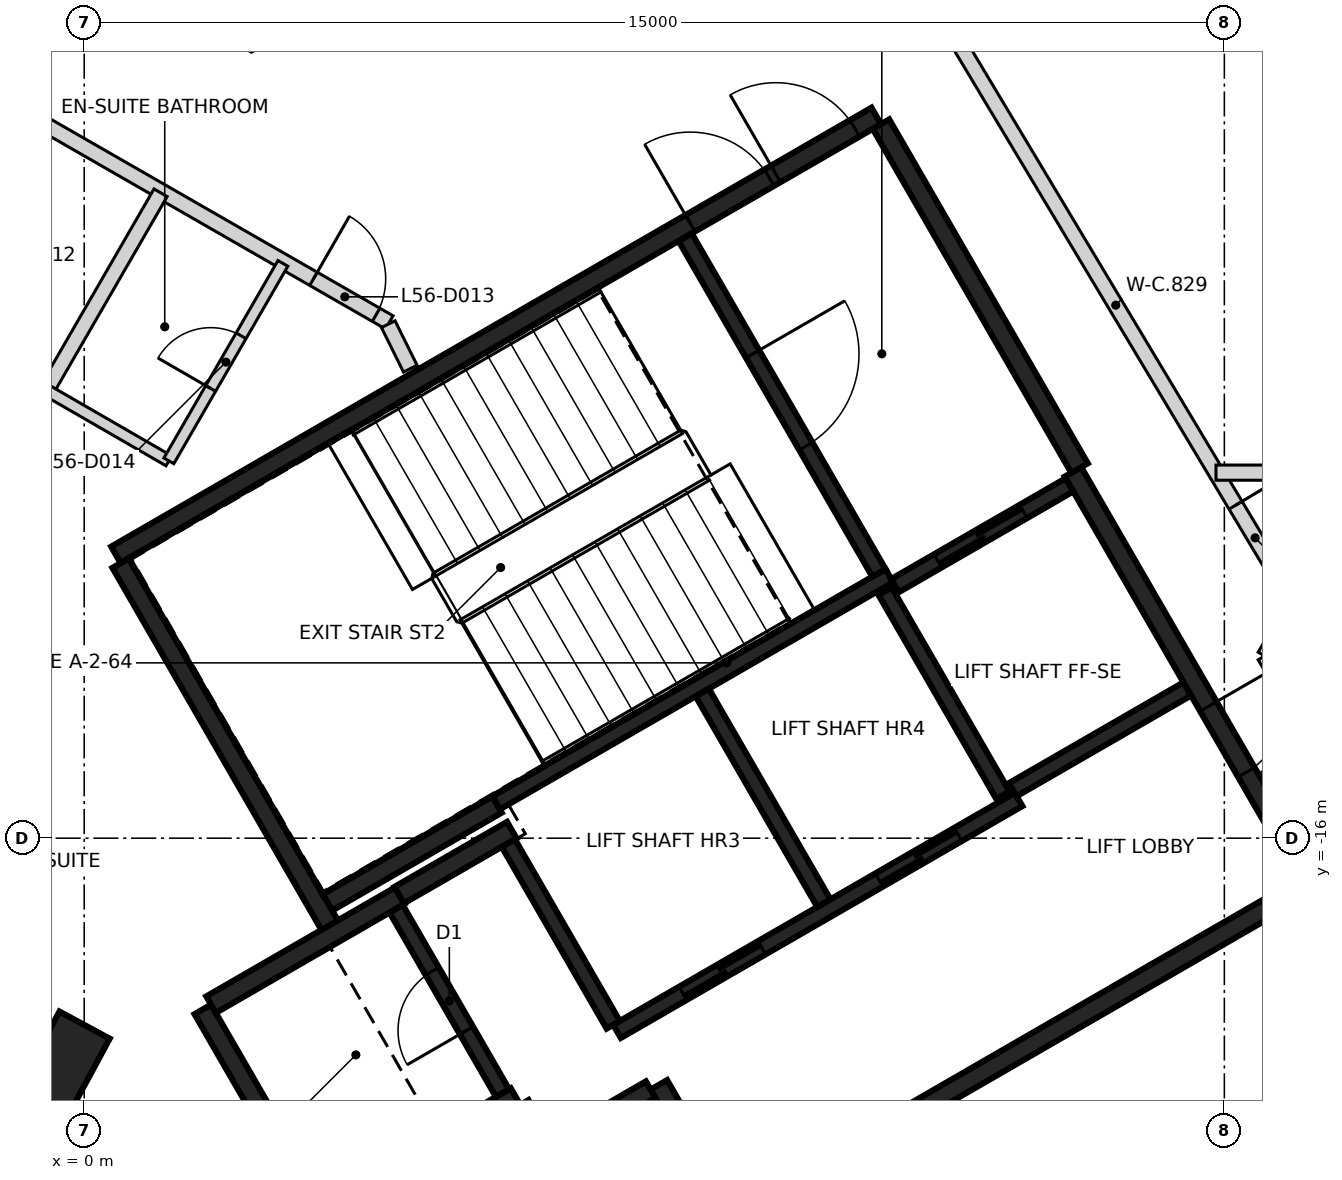
"""IFC4 building model, lengths in metres.
Left out: names, types, materials, properties, quantities, classifications, styles, units other than length and angle.
Written with IfcOpenShell. Run it as: python <this file> out.ifc"""

import sys

from ifc_helpers import new_model, si_unit, direction, frame, frame_2d, origin, origin_2d, place, context, subcontext, project, spatial, rectangle, extrude, element, fill, save


model = new_model("IFC4")
c1 = context("Model", 3, precision=1e-05, world=origin(), true_north=direction((0.0, 1.0)))
c2 = subcontext(c1, "Body", "Model", "MODEL_VIEW")
j1 = project(units=[si_unit("LENGTHUNIT", "METRE"), si_unit("PLANEANGLEUNIT", "RADIAN")], contexts=[c1])
p1 = place(None, origin())
s1 = spatial("IfcSite", under=j1, at=p1, CompositionType="ELEMENT")
p2 = place(p1, origin())
s2 = spatial("IfcBuilding", under=s1, at=p2, CompositionType="ELEMENT")
p3 = place(p2, frame((0.0, 0.0, 225.0)))
s3 = spatial("IfcBuildingStorey", under=s2, at=p3, CompositionType="ELEMENT", Elevation=225.0)
p4 = place(p3, frame((-0.256, -18.943, -0.35), z_axis=(0.0, 0.0, 1.0), x_axis=(0.474650552857, 0.880174330842, 0.0)))
e1 = element("IfcColumn", 1, at=p4, inside=s3, PredefinedType="COLUMN", context=c2, shape_type="SweptSolid", body=[
    extrude(rectangle(XDim=1.1, YDim=0.75, at=origin_2d()), origin(), (0.0, 0.0, 1.0), 3.6),
])
p5 = place(p3, frame((0.417, -12.273, 0.0), z_axis=(0.0, 0.0, 1.0), x_axis=(0.866021906294, 0.500006057782, 0.0)))
e2 = element("IfcWall", 2, at=p5, inside=s3, PredefinedType="SHEAR", context=c2, shape_type="SweptSolid", body=[
    extrude(rectangle(XDim=11.55, YDim=0.25, at=frame_2d((5.775, 0.0))), origin(), (0.0, 0.0, 1.0), 3.25),
])
p6 = place(p5, frame((10.025, 0.0, 0.0)))
e3 = element("IfcOpeningElement", 3, at=p6, cuts=e2, PredefinedType="OPENING", context=c2, shape_type="SweptSolid", body=[
    extrude(rectangle(XDim=1.2, YDim=2.1, at=frame_2d((0.6, 1.05))), frame((0.0, 0.135, 0.0), z_axis=(0.0, -1.0, 0.0), x_axis=(1.0, 0.0, 0.0)), (0.0, 0.0, 1.0), 0.27),
])
p7 = place(p5, frame((8.725, 0.0, 0.0)))
e4 = element("IfcOpeningElement", 4, at=p7, cuts=e2, PredefinedType="OPENING", context=c2, shape_type="SweptSolid", body=[
    extrude(rectangle(XDim=1.2, YDim=2.1, at=frame_2d((0.6, 1.05))), frame((0.0, 0.135, 0.0), z_axis=(0.0, -1.0, 0.0), x_axis=(1.0, 0.0, 0.0)), (0.0, 0.0, 1.0), 0.27),
])
p8 = place(p3, frame((16.133, -16.594, 0.0), z_axis=(0.0, 0.0, 1.0), x_axis=(-0.866022959057, -0.500004234368, 0.0)))
e5 = element("IfcWall", 5, at=p8, inside=s3, PredefinedType="SHEAR", context=c2, shape_type="SweptSolid", body=[
    extrude(rectangle(XDim=8.75, YDim=0.25, at=frame_2d((4.375, 0.0))), origin(), (0.0, 0.0, 1.0), 3.25),
])
p9 = place(p3, frame((13.008, -11.181, 0.0), z_axis=(0.0, 0.0, 1.0), x_axis=(0.500001955336, -0.866024274868, 0.0)))
e6 = element("IfcWall", 6, at=p9, inside=s3, PredefinedType="SHEAR", context=c2, shape_type="SweptSolid", body=[
    extrude(rectangle(XDim=6.125, YDim=0.25, at=frame_2d((3.062, 0.0))), origin(), (0.0, 0.0, 1.0), 3.25),
])
p10 = place(p9, frame((3.563, 0.0, 0.0)))
e7 = element("IfcOpeningElement", 7, at=p10, cuts=e6, PredefinedType="OPENING", context=c2, shape_type="SweptSolid", body=[
    extrude(rectangle(XDim=1.0, YDim=2.1, at=frame_2d((0.5, 1.05))), frame((0.0, 0.135, 0.0), z_axis=(0.0, -1.0, 0.0), x_axis=(1.0, 0.0, 0.0)), (0.0, 0.0, 1.0), 0.27),
])
p11 = place(p3, frame((3.235, -17.153, 0.0), z_axis=(0.0, 0.0, 1.0), x_axis=(-0.500008851346, 0.866020293397, 0.0)))
e8 = element("IfcWall", 8, at=p11, inside=s3, PredefinedType="SHEAR", context=c2, shape_type="SweptSolid", body=[
    extrude(rectangle(XDim=5.51, YDim=0.25, at=frame_2d((2.755, 0.0))), origin(), (0.0, 0.0, 1.0), 3.25),
])
p12 = place(p3, frame((10.483, -6.606, 0.0), z_axis=(0.0, 0.0, 1.0), x_axis=(0.49999885962, -0.866026062182, 0.0)))
e9 = element("IfcWall", 9, at=p12, inside=s3, PredefinedType="SHEAR", context=c2, shape_type="SweptSolid", body=[
    extrude(rectangle(XDim=5.225, YDim=0.25, at=frame_2d((2.612, 0.0))), origin(), (0.0, 0.0, 1.0), 3.25),
])
p13 = place(p3, frame((3.217, -21.122, 0.0), z_axis=(0.0, 0.0, 1.0), x_axis=(-0.499998874531, 0.866026053573, 0.0)))
e10 = element("IfcWall", 10, at=p13, inside=s3, PredefinedType="SHEAR", context=c2, shape_type="SweptSolid", body=[
    extrude(rectangle(XDim=3.313, YDim=0.25, at=frame_2d((1.656, 0.0))), origin(), (0.0, 0.0, 1.0), 3.25),
])
p14 = place(p3, frame((1.669, -18.19, 0.0), z_axis=(0.0, 0.0, 1.0), x_axis=(0.866042235819, 0.499970844928, 0.0)))
e11 = element("IfcWall", 11, at=p14, inside=s3, PredefinedType="SHEAR", context=c2, shape_type="SweptSolid", body=[
    extrude(rectangle(XDim=2.865, YDim=0.25, at=frame_2d((1.432, 0.0))), origin(), (0.0, 0.0, 1.0), 3.25),
])
p15 = place(p3, frame((5.675, -19.399, 0.0), z_axis=(0.0, 0.0, 1.0), x_axis=(-0.866026637627, -0.499997862916, 0.0)))
e12 = element("IfcWall", 12, at=p15, inside=s3, PredefinedType="SHEAR", context=c2, shape_type="SweptSolid", body=[
    extrude(rectangle(XDim=2.865, YDim=0.25, at=frame_2d((1.432, 0.0))), origin(), (0.0, 0.0, 1.0), 3.25),
])
p16 = place(p3, frame((5.431, -15.556, 0.0), z_axis=(0.0, 0.0, 1.0), x_axis=(-0.866022940537, -0.500004266446, 0.0)))
e13 = element("IfcWall", 13, at=p16, inside=s3, PredefinedType="SHEAR", context=c2, shape_type="SweptSolid", body=[
    extrude(rectangle(XDim=2.575, YDim=0.25, at=frame_2d((1.287, 0.0))), origin(), (0.0, 0.0, 1.0), 3.25),
])
p17 = place(p3, frame((8.493, -20.86, 0.0), z_axis=(0.0, 0.0, 1.0), x_axis=(-0.500039802285, 0.866002422705, 0.0)))
e14 = element("IfcWall", 14, at=p17, inside=s3, PredefinedType="SHEAR", context=c2, shape_type="SweptSolid", body=[
    extrude(rectangle(XDim=1.865, YDim=0.25, at=frame_2d((0.932, 0.0))), origin(), (0.0, 0.0, 1.0), 3.25),
])
p18 = place(p3, frame((4.145, -16.749, 0.0), z_axis=(0.0, 0.0, 1.0), x_axis=(0.866038183914, 0.499977863513, 0.0)))
e15 = element("IfcWall", 15, at=p18, inside=s3, PredefinedType="SHEAR", context=c2, shape_type="SweptSolid", body=[
    extrude(rectangle(XDim=1.71, YDim=0.25, at=frame_2d((0.855, 0.0))), origin(), (0.0, 0.0, 1.0), 3.25),
])
p19 = place(p3, frame((7.452, -19.308, 0.0), z_axis=(0.0, 0.0, 1.0), x_axis=(-0.866044474677, -0.49996696679, 0.0)))
e16 = element("IfcWall", 16, at=p19, inside=s3, PredefinedType="SHEAR", context=c2, shape_type="SweptSolid", body=[
    extrude(rectangle(XDim=1.584, YDim=0.25, at=frame_2d((0.792, 0.0))), origin(), (0.0, 0.0, 1.0), 3.25),
])
p20 = place(p3, frame((6.017, -19.992, 0.0), z_axis=(0.0, 0.0, 1.0), x_axis=(-0.500364886717, 0.865814633822, 0.0)))
e17 = element("IfcWall", 17, at=p20, inside=s3, PredefinedType="SHEAR", context=c2, shape_type="SweptSolid", body=[
    extrude(rectangle(XDim=0.559, YDim=0.25, at=frame_2d((0.28, 0.0))), origin(), (0.0, 0.0, 1.0), 3.25),
])
p21 = place(p3, frame((5.419, -15.534, 0.0), z_axis=(0.0, 0.0, 1.0), x_axis=(0.866029065029, 0.499993658486, 0.0)))
e18 = element("IfcWall", 18, at=p21, inside=s3, PredefinedType="SHEAR", context=c2, shape_type="SweptSolid", body=[
    extrude(rectangle(XDim=5.974, YDim=0.2, at=frame_2d((2.987, 0.0))), origin(), (0.0, 0.0, 1.0), 3.25),
])
p22 = place(p3, frame((7.01, -18.542, 0.0), z_axis=(0.0, 0.0, 1.0), x_axis=(0.866030299012, 0.499991521122, 0.0)))
e19 = element("IfcWall", 19, at=p22, inside=s3, PredefinedType="SHEAR", context=c2, shape_type="SweptSolid", body=[
    extrude(rectangle(XDim=6.1, YDim=0.2, at=frame_2d((3.05, 0.0))), origin(), (0.0, 0.0, 1.0), 3.25),
])
p23 = place(p22, frame((1.0, 0.0, 0.0)))
e20 = element("IfcOpeningElement", 20, at=p23, cuts=e19, PredefinedType="OPENING", context=c2, shape_type="SweptSolid", body=[
    extrude(rectangle(XDim=1.2, YDim=2.1, at=frame_2d((0.6, 1.05))), frame((0.0, 0.11, 0.0), z_axis=(0.0, -1.0, 0.0), x_axis=(1.0, 0.0, 0.0)), (0.0, 0.0, 1.0), 0.22),
])
p24 = place(p22, frame((3.982, 0.0, 0.0)))
e21 = element("IfcOpeningElement", 21, at=p24, cuts=e19, PredefinedType="OPENING", context=c2, shape_type="SweptSolid", body=[
    extrude(rectangle(XDim=1.2, YDim=2.1, at=frame_2d((0.6, 1.05))), frame((0.0, 0.11, 0.0), z_axis=(0.0, -1.0, 0.0), x_axis=(1.0, 0.0, 0.0)), (0.0, 0.0, 1.0), 0.22),
])
p25 = place(p3, frame((7.906, -8.094, 0.0), z_axis=(0.0, 0.0, 1.0), x_axis=(0.500027839223, -0.866009330205, 0.0)))
e22 = element("IfcWall", 22, at=p25, inside=s3, PredefinedType="SHEAR", context=c2, shape_type="SweptSolid", body=[
    extrude(rectangle(XDim=5.098, YDim=0.2, at=frame_2d((2.549, 0.0))), origin(), (0.0, 0.0, 1.0), 3.25),
])
p26 = place(p25, frame((1.774, 0.0, 0.0)))
e23 = element("IfcOpeningElement", 23, at=p26, cuts=e22, PredefinedType="OPENING", context=c2, shape_type="SweptSolid", body=[
    extrude(rectangle(XDim=1.4, YDim=2.1, at=frame_2d((0.7, 1.05))), frame((0.0, 0.11, 0.0), z_axis=(0.0, -1.0, 0.0), x_axis=(1.0, 0.0, 0.0)), (0.0, 0.0, 1.0), 0.22),
])
p27 = place(p3, frame((8.132, -14.084, 0.0), z_axis=(0.0, 0.0, 1.0), x_axis=(0.499997778408, -0.866026686418, 0.0)))
e24 = element("IfcWall", 24, at=p27, inside=s3, PredefinedType="SHEAR", context=c2, shape_type="SweptSolid", body=[
    extrude(rectangle(XDim=3.198, YDim=0.2, at=frame_2d((1.599, 0.0))), origin(), (0.0, 0.0, 1.0), 3.25),
])
p28 = place(p3, frame((5.503, -19.352, 0.0), z_axis=(0.0, 0.0, 1.0), x_axis=(-0.499986818241, 0.866033014143, 0.0)))
e25 = element("IfcWall", 25, at=p28, inside=s3, PredefinedType="SHEAR", context=c2, shape_type="SweptSolid", body=[
    extrude(rectangle(XDim=2.798, YDim=0.2, at=frame_2d((1.399, 0.0))), origin(), (0.0, 0.0, 1.0), 3.25),
])
p29 = place(p28, frame((0.949, 0.0, 0.0)))
e26 = element("IfcOpeningElement", 26, at=p29, cuts=e25, PredefinedType="OPENING", context=c2, shape_type="SweptSolid", body=[
    extrude(rectangle(XDim=0.9, YDim=2.1, at=frame_2d((0.45, 1.05))), frame((0.0, 0.11, 0.0), z_axis=(0.0, -1.0, 0.0), x_axis=(1.0, 0.0, 0.0)), (0.0, 0.0, 1.0), 0.22),
])
p30 = place(p3, frame((6.96, -18.455, 0.0), z_axis=(0.0, 0.0, 1.0), x_axis=(-0.499926705758, 0.866067716099, 0.0)))
e27 = element("IfcWall", 27, at=p30, inside=s3, PredefinedType="SHEAR", context=c2, shape_type="SweptSolid", body=[
    extrude(rectangle(XDim=2.759, YDim=0.2, at=frame_2d((1.38, 0.0))), origin(), (0.0, 0.0, 1.0), 3.25),
])
p31 = place(p3, frame((12.088, -15.437, 0.0), z_axis=(0.0, 0.0, 1.0), x_axis=(-0.500026960575, 0.86600983753, 0.0)))
e28 = element("IfcWall", 28, at=p31, inside=s3, PredefinedType="SHEAR", context=c2, shape_type="SweptSolid", body=[
    extrude(rectangle(XDim=3.1, YDim=0.2, at=frame_2d((1.55, 0.0))), origin(), (0.0, 0.0, 1.0), 3.25),
])
p32 = place(p3, frame((10.666, -12.678, 0.0), z_axis=(0.0, 0.0, 1.0), x_axis=(0.866018407898, 0.500012117035, 0.0)))
e29 = element("IfcWall", 29, at=p32, inside=s3, PredefinedType="SHEAR", context=c2, shape_type="SweptSolid", body=[
    extrude(rectangle(XDim=2.651, YDim=0.2, at=frame_2d((1.325, 0.0))), origin(), (0.0, 0.0, 1.0), 3.25),
])
p33 = place(p32, frame((0.652, 0.0, 0.0)))
e30 = element("IfcOpeningElement", 30, at=p33, cuts=e29, PredefinedType="OPENING", context=c2, shape_type="SweptSolid", body=[
    extrude(rectangle(XDim=1.3, YDim=2.1, at=frame_2d((0.65, 1.05))), frame((0.0, 0.11, 0.0), z_axis=(0.0, -1.0, 0.0), x_axis=(1.0, 0.0, 0.0)), (0.0, 0.0, 1.0), 0.22),
])
p34 = place(p3, frame((14.512, -14.037, 0.0), z_axis=(0.0, 0.0, 1.0), x_axis=(-0.866018407898, -0.500012117035, 0.0)))
e31 = element("IfcWall", 31, at=p34, inside=s3, PredefinedType="SHEAR", context=c2, shape_type="SweptSolid", body=[
    extrude(rectangle(XDim=2.651, YDim=0.2, at=frame_2d((1.325, 0.0))), origin(), (0.0, 0.0, 1.0), 3.25),
])
p35 = place(p3, frame((-7.089, -2.836, 0.0), z_axis=(0.0, 0.0, 1.0), x_axis=(0.867106243364, -0.498123240493, 0.0)))
e32 = element("IfcWall", 32, at=p35, inside=s3, PredefinedType="PARTITIONING", context=c2, shape_type="SweptSolid", body=[
    extrude(rectangle(XDim=12.804, YDim=0.2, at=frame_2d((6.402, 0.0))), origin(), (0.0, 0.0, 1.0), 3.25),
])
p36 = place(p35, frame((1.909, 0.0, 0.0)))
e33 = element("IfcOpeningElement", 33, at=p36, cuts=e32, PredefinedType="OPENING", context=c2, shape_type="SweptSolid", body=[
    extrude(rectangle(XDim=1.0, YDim=2.1, at=frame_2d((0.5, 1.05))), frame((0.0, 0.11, 0.0), z_axis=(0.0, -1.0, 0.0), x_axis=(1.0, 0.0, 0.0)), (0.0, 0.0, 1.0), 0.22),
])
p37 = place(p35, frame((4.91, 0.0, 0.0)))
e34 = element("IfcOpeningElement", 34, at=p37, cuts=e32, PredefinedType="OPENING", context=c2, shape_type="SweptSolid", body=[
    extrude(rectangle(XDim=0.95, YDim=2.1, at=frame_2d((0.475, 1.05))), frame((0.0, 0.11, 0.0), z_axis=(0.0, -1.0, 0.0), x_axis=(1.0, 0.0, 0.0)), (0.0, 0.0, 1.0), 0.22),
])
p38 = place(p35, frame((11.654, 0.0, 0.0)))
e35 = element("IfcOpeningElement", 35, at=p38, cuts=e32, PredefinedType="OPENING", context=c2, shape_type="SweptSolid", body=[
    extrude(rectangle(XDim=0.95, YDim=2.1, at=frame_2d((0.475, 1.05))), frame((0.0, 0.11, 0.0), z_axis=(0.0, -1.0, 0.0), x_axis=(1.0, 0.0, 0.0)), (0.0, 0.0, 1.0), 0.22),
])
p39 = place(p3, frame((4.0, -9.238, 0.0), z_axis=(0.0, 0.0, 1.0), x_axis=(0.444370954227, -0.89584287408, 0.0)))
e36 = element("IfcWall", 36, at=p39, inside=s3, PredefinedType="PARTITIONING", context=c2, shape_type="SweptSolid", body=[
    extrude(rectangle(XDim=0.653, YDim=0.2, at=frame_2d((0.327, 0.0))), origin(), (0.0, 0.0, 1.0), 3.25),
])
p40 = place(p3, frame((11.217, -5.058, 0.0), z_axis=(0.0, 0.0, 1.0), x_axis=(0.513856906336, -0.857875911662, 0.0)))
e37 = element("IfcWall", 37, at=p40, inside=s3, PredefinedType="PARTITIONING", context=c2, shape_type="SweptSolid", body=[
    extrude(rectangle(XDim=9.163, YDim=0.2, at=frame_2d((4.581, 0.0))), origin(), (0.0, 0.0, 1.0), 3.25),
])
p41 = place(p40, frame((7.65, 0.0, 0.0)))
e38 = element("IfcOpeningElement", 38, at=p41, cuts=e37, PredefinedType="OPENING", context=c2, shape_type="SweptSolid", body=[
    extrude(rectangle(XDim=1.0, YDim=2.1, at=frame_2d((0.5, 1.05))), frame((0.0, 0.11, 0.0), z_axis=(0.0, -1.0, 0.0), x_axis=(1.0, 0.0, 0.0)), (0.0, 0.0, 1.0), 0.22),
])
p42 = place(p3, frame((15.55, -15.213, 0.0), z_axis=(0.0, 0.0, 1.0), x_axis=(0.865989998118, 0.500061319399, 0.0)))
e39 = element("IfcWall", 39, at=p42, inside=s3, PredefinedType="PARTITIONING", context=c2, shape_type="SweptSolid", body=[
    extrude(rectangle(XDim=0.79, YDim=0.2, at=frame_2d((0.395, 0.0))), origin(), (0.0, 0.0, 1.0), 2.35),
])
p43 = place(p3, frame((15.532, -13.603, 0.0), z_axis=(0.0, 0.0, 1.0), x_axis=(0.498203662485, 0.867060038686, 0.0)))
e40 = element("IfcWall", 40, at=p43, inside=s3, PredefinedType="PARTITIONING", context=c2, shape_type="SweptSolid", body=[
    extrude(rectangle(XDim=0.789, YDim=0.2, at=frame_2d((0.395, 0.0))), origin(), (0.0, 0.0, 1.0), 3.25),
])
p44 = place(p3, frame((15.532, -13.603, 0.0), z_axis=(0.0, 0.0, 1.0), x_axis=(0.500199332748, -0.865910288378, 0.0)))
e41 = element("IfcWall", 41, at=p44, inside=s3, PredefinedType="PARTITIONING", context=c2, shape_type="SweptSolid", body=[
    extrude(rectangle(XDim=1.403, YDim=0.2, at=frame_2d((0.702, 0.0))), origin(), (0.0, 0.0, 1.0), 2.35),
])
p45 = place(p3, frame((-5.097, -18.078, 0.0), z_axis=(0.0, 0.0, 1.0), x_axis=(0.499960272111, 0.866048339477, 0.0)))
e42 = element("IfcWall", 42, at=p45, inside=s3, PredefinedType="PARTITIONING", context=c2, shape_type="SweptSolid", body=[
    extrude(rectangle(XDim=12.204, YDim=0.2, at=frame_2d((6.102, 0.0))), origin(), (0.0, 0.0, 1.0), 3.25),
])
p46 = place(p3, frame((14.89, -11.191, 0.0), z_axis=(0.0, 0.0, 1.0), x_axis=(1.0, 0.0, 0.0)))
e43 = element("IfcWall", 43, at=p46, inside=s3, PredefinedType="PARTITIONING", context=c2, shape_type="SweptSolid", body=[
    extrude(rectangle(XDim=3.142, YDim=0.2, at=frame_2d((1.571, 0.0))), origin(), (0.0, 0.0, 1.0), 2.35),
])
p47 = place(p3, frame((-2.833, -8.757, 0.0), z_axis=(0.0, 0.0, 1.0), x_axis=(0.866002713795, -0.500039298155, 0.0)))
e44 = element("IfcWall", 44, at=p47, inside=s3, PredefinedType="PARTITIONING", context=c2, shape_type="SweptSolid", body=[
    extrude(rectangle(XDim=4.558, YDim=0.15, at=frame_2d((2.279, 0.0))), origin(), (0.0, 0.0, 1.0), 3.25),
])
p48 = place(p3, frame((1.114, -11.036, 0.0), z_axis=(0.0, 0.0, 1.0), x_axis=(0.50002537861, 0.866010750942, 0.0)))
e45 = element("IfcWall", 45, at=p48, inside=s3, PredefinedType="PARTITIONING", context=c2, shape_type="SweptSolid", body=[
    extrude(rectangle(XDim=3.0, YDim=0.15, at=frame_2d((1.5, 0.0))), origin(), (0.0, 0.0, 1.0), 3.25),
])
p49 = place(p48, frame((1.1, 0.0, 0.0)))
e46 = element("IfcOpeningElement", 46, at=p49, cuts=e45, PredefinedType="OPENING", context=c2, shape_type="SweptSolid", body=[
    extrude(rectangle(XDim=0.8, YDim=2.1, at=frame_2d((0.4, 1.05))), frame((0.0, 0.085, 0.0), z_axis=(0.0, -1.0, 0.0), x_axis=(1.0, 0.0, 0.0)), (0.0, 0.0, 1.0), 0.17),
])
p50 = place(p33, origin())
e47 = element("IfcDoor", 47, at=p50, inside=s3, OperationType="SLIDING_TO_LEFT", PredefinedType="DOOR", context=c2, shape_type="SweptSolid", body=[
    extrude(rectangle(XDim=1.3, YDim=2.1, at=frame_2d((0.65, 1.05))), frame((0.0, 0.025, 0.0), z_axis=(0.0, -1.0, 0.0), x_axis=(1.0, 0.0, 0.0)), (0.0, 0.0, 1.0), 0.05),
])
fill(e30, e47)
p51 = place(p23, origin())
e48 = element("IfcDoor", 48, at=p51, inside=s3, OperationType="DOUBLE_DOOR_SLIDING", PredefinedType="DOOR", context=c2, shape_type="SweptSolid", body=[
    extrude(rectangle(XDim=1.2, YDim=2.1, at=frame_2d((0.6, 1.05))), frame((0.0, 0.025, 0.0), z_axis=(0.0, -1.0, 0.0), x_axis=(1.0, 0.0, 0.0)), (0.0, 0.0, 1.0), 0.05),
])
fill(e20, e48)
p52 = place(p24, origin())
e49 = element("IfcDoor", 49, at=p52, inside=s3, OperationType="DOUBLE_DOOR_SLIDING", PredefinedType="DOOR", context=c2, shape_type="SweptSolid", body=[
    extrude(rectangle(XDim=1.2, YDim=2.1, at=frame_2d((0.6, 1.05))), frame((0.0, 0.025, 0.0), z_axis=(0.0, -1.0, 0.0), x_axis=(1.0, 0.0, 0.0)), (0.0, 0.0, 1.0), 0.05),
])
fill(e21, e49)
p53 = place(p10, origin())
e50 = element("IfcDoor", 50, at=p53, inside=s3, OperationType="SINGLE_SWING_LEFT", PredefinedType="DOOR", context=c2, shape_type="SweptSolid", body=[
    extrude(rectangle(XDim=1.0, YDim=2.1, at=frame_2d((0.5, 1.05))), frame((0.0, 0.025, 0.0), z_axis=(0.0, -1.0, 0.0), x_axis=(1.0, 0.0, 0.0)), (0.0, 0.0, 1.0), 0.05),
])
fill(e7, e50)
p54 = place(p6, origin())
e51 = element("IfcDoor", 51, at=p54, inside=s3, OperationType="SINGLE_SWING_LEFT", PredefinedType="DOOR", context=c2, shape_type="SweptSolid", body=[
    extrude(rectangle(XDim=1.2, YDim=2.1, at=frame_2d((0.6, 1.05))), frame((0.0, 0.025, 0.0), z_axis=(0.0, -1.0, 0.0), x_axis=(1.0, 0.0, 0.0)), (0.0, 0.0, 1.0), 0.05),
])
fill(e3, e51)
p55 = place(p7, origin())
e52 = element("IfcDoor", 52, at=p55, inside=s3, OperationType="SINGLE_SWING_RIGHT", PredefinedType="DOOR", context=c2, shape_type="SweptSolid", body=[
    extrude(rectangle(XDim=1.2, YDim=2.1, at=frame_2d((0.6, 1.05))), frame((0.0, 0.025, 0.0), z_axis=(0.0, -1.0, 0.0), x_axis=(1.0, 0.0, 0.0)), (0.0, 0.0, 1.0), 0.05),
])
fill(e4, e52)
p56 = place(p26, origin())
e53 = element("IfcDoor", 53, at=p56, inside=s3, OperationType="SINGLE_SWING_LEFT", PredefinedType="DOOR", context=c2, shape_type="SweptSolid", body=[
    extrude(rectangle(XDim=1.4, YDim=2.1, at=frame_2d((0.7, 1.05))), frame((0.0, 0.025, 0.0), z_axis=(0.0, -1.0, 0.0), x_axis=(1.0, 0.0, 0.0)), (0.0, 0.0, 1.0), 0.05),
])
fill(e23, e53)
p57 = place(p29, origin())
e54 = element("IfcDoor", 54, at=p57, inside=s3, OperationType="SINGLE_SWING_RIGHT", PredefinedType="DOOR", context=c2, shape_type="SweptSolid", body=[
    extrude(rectangle(XDim=0.9, YDim=2.1, at=frame_2d((0.45, 1.05))), frame((0.0, 0.025, 0.0), z_axis=(0.0, -1.0, 0.0), x_axis=(1.0, 0.0, 0.0)), (0.0, 0.0, 1.0), 0.05),
])
fill(e26, e54)
p58 = place(p38, frame((0.95, 0.0, 0.0), z_axis=(0.0, 0.0, 1.0), x_axis=(-1.0, 0.0, 0.0)))
e55 = element("IfcDoor", 55, at=p58, inside=s3, OperationType="SINGLE_SWING_LEFT", PredefinedType="DOOR", context=c2, shape_type="SweptSolid", body=[
    extrude(rectangle(XDim=0.95, YDim=2.1, at=frame_2d((0.475, 1.05))), frame((0.0, 0.025, 0.0), z_axis=(0.0, -1.0, 0.0), x_axis=(1.0, 0.0, 0.0)), (0.0, 0.0, 1.0), 0.05),
])
fill(e35, e55)
p59 = place(p49, origin())
e56 = element("IfcDoor", 56, at=p59, inside=s3, OperationType="SINGLE_SWING_LEFT", PredefinedType="DOOR", context=c2, shape_type="SweptSolid", body=[
    extrude(rectangle(XDim=0.8, YDim=2.1, at=frame_2d((0.4, 1.05))), frame((0.0, 0.025, 0.0), z_axis=(0.0, -1.0, 0.0), x_axis=(1.0, 0.0, 0.0)), (0.0, 0.0, 1.0), 0.05),
])
fill(e46, e56)
p60 = place(p41, frame((1.0, 0.0, 0.0), z_axis=(0.0, 0.0, 1.0), x_axis=(-1.0, 0.0, 0.0)))
e57 = element("IfcDoor", 57, at=p60, inside=s3, OperationType="SINGLE_SWING_LEFT", PredefinedType="DOOR", context=c2, shape_type="SweptSolid", body=[
    extrude(rectangle(XDim=1.0, YDim=2.1, at=frame_2d((0.5, 1.05))), frame((0.0, 0.025, 0.0), z_axis=(0.0, -1.0, 0.0), x_axis=(1.0, 0.0, 0.0)), (0.0, 0.0, 1.0), 0.05),
])
fill(e38, e57)
save(model, sys.argv[1])
